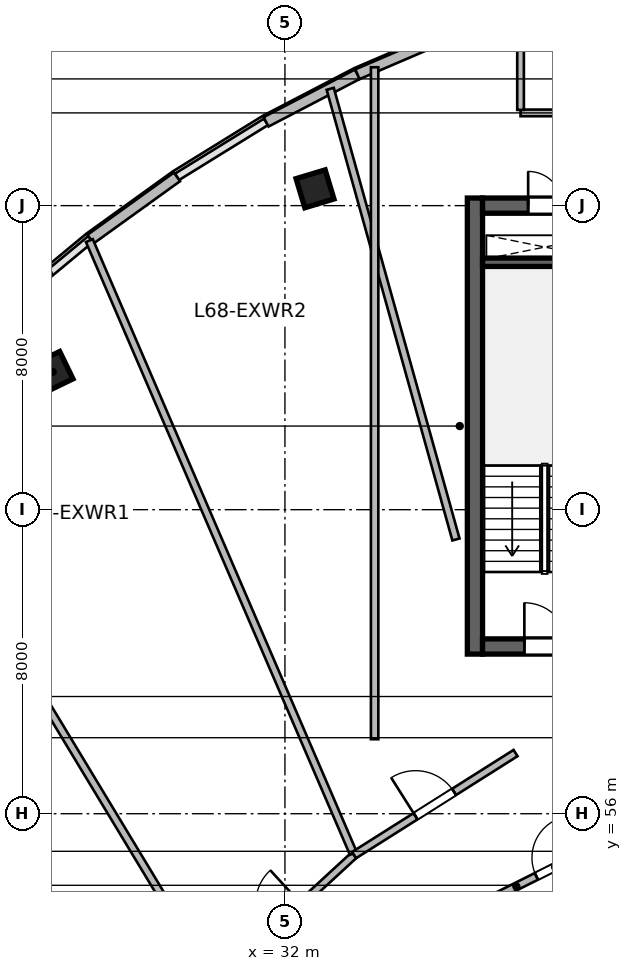
"""IFC4 building model, lengths in metres.
Left out: names, types, materials, properties, quantities, classifications, styles, units other than length and angle.
Written with IfcOpenShell. Run it as: python <this file> out.ifc"""

import sys

from ifc_helpers import new_model, si_unit, direction, frame, frame_2d, origin, origin_2d, place, context, subcontext, project, spatial, rectangle, extrude, source, transform, mapped, element, fill, save


model = new_model("IFC4")
c1 = context("Model", 3, precision=1e-05, world=origin(), true_north=direction((0.0, 1.0)))
c2 = subcontext(c1, "Body", "Model", "MODEL_VIEW")
j1 = project(units=[si_unit("LENGTHUNIT", "METRE"), si_unit("PLANEANGLEUNIT", "RADIAN")], contexts=[c1])
p1 = place(None, origin())
s1 = spatial("IfcSite", under=j1, at=p1, CompositionType="ELEMENT")
p2 = place(p1, origin())
s2 = spatial("IfcBuilding", under=s1, at=p2, CompositionType="ELEMENT")
p3 = place(p2, frame((0.0, 0.0, 279.6)))
s3 = spatial("IfcBuildingStorey", under=s2, at=p3, CompositionType="ELEMENT", Elevation=279.6)
m1 = source(origin(), c2, "Body", "SweptSolid", [
    extrude(rectangle(XDim=12.0, YDim=0.4, at=frame_2d((6.0, 0.0))), origin(), (0.0, 0.0, 1.0), 3.9),
])
p4 = place(p3, frame((37.0, 60.2, 0.0), z_axis=(0.0, 0.0, 1.0), x_axis=(0.0, 1.0, 0.0)))
e1 = element("IfcWall", 1, at=p4, inside=s3, PredefinedType="SHEAR", context=c2, shape_type="MappedRepresentation", body=[
    mapped(m1, transform((0.0, 0.0, 0.0), scale=1.0)),
])
m2 = source(origin(), c2, "Body", "SweptSolid", [
    extrude(rectangle(XDim=21.6, YDim=0.4, at=frame_2d((10.8, 0.0))), origin(), (0.0, 0.0, 1.0), 3.9),
])
p5 = place(p3, frame((37.2, 60.4, 0.0), z_axis=(0.0, 0.0, 1.0), x_axis=(1.0, 0.0, 0.0)))
e2 = element("IfcWall", 2, at=p5, inside=s3, PredefinedType="SHEAR", context=c2, shape_type="MappedRepresentation", body=[
    mapped(m2, transform((0.0, 0.0, 0.0), scale=1.0)),
])
p6 = place(p5, frame((1.1, 0.0, 0.0)))
e3 = element("IfcOpeningElement", 3, at=p6, cuts=e2, PredefinedType="OPENING", context=c2, shape_type="SweptSolid", body=[
    extrude(rectangle(XDim=1.15, YDim=2.15, at=frame_2d((0.575, 1.075))), frame((0.0, 0.21, 0.0), z_axis=(0.0, -1.0, 0.0), x_axis=(1.0, 0.0, 0.0)), (0.0, 0.0, 1.0), 0.42),
])
p7 = place(p5, frame((19.5, 0.0, 0.0)))
e4 = element("IfcOpeningElement", 4, at=p7, cuts=e2, PredefinedType="OPENING", context=c2, shape_type="SweptSolid", body=[
    extrude(rectangle(XDim=0.9, YDim=2.1, at=frame_2d((0.45, 1.05))), frame((0.0, 0.21, 0.0), z_axis=(0.0, -1.0, 0.0), x_axis=(1.0, 0.0, 0.0)), (0.0, 0.0, 1.0), 0.42),
])
p8 = place(p5, frame((12.02, 0.0, 0.0)))
e5 = element("IfcOpeningElement", 5, at=p8, cuts=e2, PredefinedType="OPENING", context=c2, shape_type="SweptSolid", body=[
    extrude(rectangle(XDim=1.6, YDim=2.15, at=frame_2d((0.8, 1.075))), frame((0.0, 0.21, 0.0), z_axis=(0.0, -1.0, 0.0), x_axis=(1.0, 0.0, 0.0)), (0.0, 0.0, 1.0), 0.42),
])
p9 = place(p3, frame((37.2, 72.0, 0.0), z_axis=(0.0, 0.0, 1.0), x_axis=(1.0, 0.0, 0.0)))
e6 = element("IfcWall", 6, at=p9, inside=s3, PredefinedType="SHEAR", context=c2, shape_type="MappedRepresentation", body=[
    mapped(m2, transform((0.0, 0.0, 0.0), scale=1.0)),
])
p10 = place(p9, frame((1.2, 0.0, 0.0)))
e7 = element("IfcOpeningElement", 7, at=p10, cuts=e6, PredefinedType="OPENING", context=c2, shape_type="SweptSolid", body=[
    extrude(rectangle(XDim=0.9, YDim=2.1, at=frame_2d((0.45, 1.05))), frame((0.0, 0.21, 0.0), z_axis=(0.0, -1.0, 0.0), x_axis=(1.0, 0.0, 0.0)), (0.0, 0.0, 1.0), 0.42),
])
p11 = place(p9, frame((14.7, 0.0, 0.0)))
e8 = element("IfcOpeningElement", 8, at=p11, cuts=e6, PredefinedType="OPENING", context=c2, shape_type="SweptSolid", body=[
    extrude(rectangle(XDim=1.2, YDim=2.15, at=frame_2d((0.6, 1.075))), frame((0.0, 0.21, 0.0), z_axis=(0.0, -1.0, 0.0), x_axis=(1.0, 0.0, 0.0)), (0.0, 0.0, 1.0), 0.42),
])
p12 = place(p9, frame((4.15, 0.0, 0.0)))
e9 = element("IfcOpeningElement", 9, at=p12, cuts=e6, PredefinedType="OPENING", context=c2, shape_type="SweptSolid", body=[
    extrude(rectangle(XDim=1.3, YDim=2.15, at=frame_2d((0.65, 1.075))), frame((0.0, 0.21, 0.0), z_axis=(0.0, -1.0, 0.0), x_axis=(1.0, 0.0, 0.0)), (0.0, 0.0, 1.0), 0.42),
])
p13 = place(p9, frame((7.25, 0.0, 0.0)))
e10 = element("IfcOpeningElement", 10, at=p13, cuts=e6, PredefinedType="OPENING", context=c2, shape_type="SweptSolid", body=[
    extrude(rectangle(XDim=0.9, YDim=2.1, at=frame_2d((0.45, 1.05))), frame((0.0, 0.21, 0.0), z_axis=(0.0, -1.0, 0.0), x_axis=(1.0, 0.0, 0.0)), (0.0, 0.0, 1.0), 0.42),
])
m3 = source(origin(), c2, "Body", "SweptSolid", [
    extrude(rectangle(XDim=3.27, YDim=0.22, at=frame_2d((1.635, 0.0))), origin(), (0.0, 0.0, 1.0), 3.9),
])
p14 = place(p3, frame((37.2, 70.51, 0.0), z_axis=(0.0, 0.0, 1.0), x_axis=(1.0, 0.0, 0.0)))
e11 = element("IfcWall", 11, at=p14, inside=s3, PredefinedType="SHEAR", context=c2, shape_type="MappedRepresentation", body=[
    mapped(m3, transform((0.0, 0.0, 0.0), scale=1.0)),
])
m4 = source(origin(), c2, "Body", "SweptSolid", [
    extrude(rectangle(XDim=0.8, YDim=0.8, at=origin_2d()), origin(), (0.0, 0.0, 1.0), 3.9),
])
for number, where, z_axis, x_axis in (
    (12, (25.888, 67.627, 0.0), (0.0, 0.0, 1.0), (-0.436, 0.9, 0.0)),
    (13, (32.791, 72.442, 0.0), (0.0, 0.0, 1.0), (-0.289, 0.957, 0.0)),
):
    element("IfcColumn", number, at=place(p3, frame(where, z_axis=z_axis, x_axis=x_axis)), inside=s3, PredefinedType="COLUMN", context=c2, shape_type="MappedRepresentation", body=[
        mapped(m4, transform((0.0, 0.0, 0.0), scale=1.0)),
    ])
m5 = source(origin(), c2, "Body", "SweptSolid", [
    extrude(rectangle(XDim=2.802, YDim=0.28, at=frame_2d((1.401, 0.0))), origin(), (0.0, 0.0, 1.0), 3.64),
])
p15 = place(p3, frame((26.885, 71.12, 0.0), z_axis=(0.0, 0.0, 1.0), x_axis=(0.811507896482, 0.584341453217, 0.0)))
e14 = element("IfcWall", 14, at=p15, inside=s3, PredefinedType="SOLIDWALL", context=c2, shape_type="MappedRepresentation", body=[
    mapped(m5, transform((0.0, 0.0, 0.0), scale=1.0)),
])
m6 = source(origin(), c2, "Body", "SweptSolid", [
    extrude(rectangle(XDim=2.711, YDim=0.28, at=frame_2d((1.356, 0.0))), origin(), (0.0, 0.0, 1.0), 3.64),
])
p16 = place(p3, frame((31.502, 74.205, 0.0), z_axis=(0.0, 0.0, 1.0), x_axis=(0.886828760751, 0.462098202881, 0.0)))
e15 = element("IfcWall", 15, at=p16, inside=s3, PredefinedType="SOLIDWALL", context=c2, shape_type="MappedRepresentation", body=[
    mapped(m6, transform((0.0, 0.0, 0.0), scale=1.0)),
])
m7 = source(origin(), c2, "Body", "SweptSolid", [
    extrude(rectangle(XDim=2.673, YDim=0.28, at=frame_2d((1.337, 0.0))), origin(), (0.0, 0.0, 1.0), 3.64),
])
p17 = place(p3, frame((33.907, 75.458, 0.0), z_axis=(0.0, 0.0, 1.0), x_axis=(0.919036345912, 0.394172798266, 0.0)))
e16 = element("IfcWall", 16, at=p17, inside=s3, PredefinedType="SOLIDWALL", context=c2, shape_type="MappedRepresentation", body=[
    mapped(m7, transform((0.0, 0.0, 0.0), scale=1.0)),
])
m8 = source(origin(), c2, "Body", "SweptSolid", [
    extrude(rectangle(XDim=4.0, YDim=0.175, at=frame_2d((2.0, 0.0))), origin(), (0.0, 0.0, 1.0), 3.64),
])
p18 = place(p3, frame((38.2, 74.44, 0.0), z_axis=(0.0, 0.0, 1.0), x_axis=(1.0, 0.0, 0.0)))
e17 = element("IfcWall", 17, at=p18, inside=s3, PredefinedType="PARTITIONING", context=c2, shape_type="MappedRepresentation", body=[
    mapped(m8, transform((0.0, 0.0, 0.0), scale=1.0)),
])
p19 = place(p18, frame((2.7, 0.0, 0.0)))
e18 = element("IfcOpeningElement", 18, at=p19, cuts=e17, PredefinedType="OPENING", context=c2, shape_type="SweptSolid", body=[
    extrude(rectangle(XDim=0.9, YDim=2.08, at=frame_2d((0.45, 1.04))), frame((0.0, 0.098, 0.0), z_axis=(0.0, -1.0, 0.0), x_axis=(1.0, 0.0, 0.0)), (0.0, 0.0, 1.0), 0.195),
])
m9 = source(origin(), c2, "Body", "SweptSolid", [
    extrude(rectangle(XDim=2.403, YDim=0.175, at=frame_2d((1.201, 0.0))), origin(), (0.0, 0.0, 1.0), 3.64),
])
p20 = place(p3, frame((38.2, 74.519, 0.0), z_axis=(0.0, 0.0, 1.0), x_axis=(0.0, 1.0, 0.0)))
e19 = element("IfcWall", 19, at=p20, inside=s3, PredefinedType="PARTITIONING", context=c2, shape_type="MappedRepresentation", body=[
    mapped(m9, transform((0.0, 0.0, 0.0), scale=1.0)),
])
m10 = source(origin(), c2, "Body", "SweptSolid", [
    extrude(rectangle(XDim=4.271, YDim=0.195, at=frame_2d((2.135, 0.0))), origin(), (0.0, 0.0, 1.0), 3.64),
])
p21 = place(p3, frame((37.021, 53.552, 0.0), z_axis=(0.0, 0.0, 1.0), x_axis=(0.894061035522, 0.447945158207, 0.0)))
e20 = element("IfcWall", 20, at=p21, inside=s3, PredefinedType="PARTITIONING", context=c2, shape_type="MappedRepresentation", body=[
    mapped(m10, transform((0.0, 0.0, 0.0), scale=1.0)),
])
p22 = place(p21, frame((1.785, 0.0, 0.0)))
e21 = element("IfcOpeningElement", 21, at=p22, cuts=e20, PredefinedType="OPENING", context=c2, shape_type="SweptSolid", body=[
    extrude(rectangle(XDim=1.1, YDim=2.15, at=frame_2d((0.55, 1.075))), frame((0.0, 0.107, 0.0), z_axis=(0.0, -1.0, 0.0), x_axis=(1.0, 0.0, 0.0)), (0.0, 0.0, 1.0), 0.215),
])
m11 = source(origin(), c2, "Body", "SweptSolid", [
    extrude(rectangle(XDim=4.986, YDim=0.195, at=frame_2d((2.493, 0.0))), origin(), (0.0, 0.0, 1.0), 3.64),
])
p23 = place(p3, frame((30.153, 51.533, 0.0), z_axis=(0.0, 0.0, 1.0), x_axis=(0.735595190169, 0.677421372707, 0.0)))
e22 = element("IfcWall", 22, at=p23, inside=s3, PredefinedType="PARTITIONING", context=c2, shape_type="MappedRepresentation", body=[
    mapped(m11, transform((0.0, 0.0, 0.0), scale=1.0)),
])
p24 = place(p23, frame((1.893, 0.0, 0.0)))
e23 = element("IfcOpeningElement", 23, at=p24, cuts=e22, PredefinedType="OPENING", context=c2, shape_type="SweptSolid", body=[
    extrude(rectangle(XDim=1.2, YDim=2.15, at=frame_2d((0.6, 1.075))), frame((0.0, 0.107, 0.0), z_axis=(0.0, -1.0, 0.0), x_axis=(1.0, 0.0, 0.0)), (0.0, 0.0, 1.0), 0.215),
])
m12 = source(origin(), c2, "Body", "SweptSolid", [
    extrude(rectangle(XDim=16.121, YDim=0.195, at=frame_2d((8.061, 0.0))), origin(), (0.0, 0.0, 1.0), 3.64),
])
p25 = place(p3, frame((30.127, 51.575, 0.0), z_axis=(0.0, 0.0, 1.0), x_axis=(-0.517212483904, 0.855857024563, 0.0)))
e24 = element("IfcWall", 24, at=p25, inside=s3, PredefinedType="PARTITIONING", context=c2, shape_type="MappedRepresentation", body=[
    mapped(m12, transform((0.0, 0.0, 0.0), scale=1.0)),
])
m13 = source(origin(), c2, "Body", "SweptSolid", [
    extrude(rectangle(XDim=17.556, YDim=0.195, at=frame_2d((8.778, 0.0))), origin(), (0.0, 0.0, 1.0), 3.64),
])
p26 = place(p3, frame((33.8, 54.958, 0.0), z_axis=(0.0, 0.0, 1.0), x_axis=(-0.395687598313, 0.918385172213, 0.0)))
e25 = element("IfcWall", 25, at=p26, inside=s3, PredefinedType="PARTITIONING", context=c2, shape_type="MappedRepresentation", body=[
    mapped(m13, transform((0.0, 0.0, 0.0), scale=1.0)),
])
m14 = source(origin(), c2, "Body", "SweptSolid", [
    extrude(rectangle(XDim=5.025, YDim=0.195, at=frame_2d((2.513, 0.0))), origin(), (0.0, 0.0, 1.0), 3.64),
])
p27 = place(p3, frame((33.82, 54.911, 0.0), z_axis=(0.0, 0.0, 1.0), x_axis=(0.84532378062, 0.534254345717, 0.0)))
e26 = element("IfcWall", 26, at=p27, inside=s3, PredefinedType="PARTITIONING", context=c2, shape_type="MappedRepresentation", body=[
    mapped(m14, transform((0.0, 0.0, 0.0), scale=1.0)),
])
p28 = place(p27, frame((1.913, 0.0, 0.0)))
e27 = element("IfcOpeningElement", 27, at=p28, cuts=e26, PredefinedType="OPENING", context=c2, shape_type="SweptSolid", body=[
    extrude(rectangle(XDim=1.2, YDim=2.15, at=frame_2d((0.6, 1.075))), frame((0.0, 0.107, 0.0), z_axis=(0.0, -1.0, 0.0), x_axis=(1.0, 0.0, 0.0)), (0.0, 0.0, 1.0), 0.215),
])
m15 = source(origin(), c2, "Body", "SweptSolid", [
    extrude(rectangle(XDim=12.311, YDim=0.195, at=frame_2d((6.155, 0.0))), origin(), (0.0, 0.0, 1.0), 3.64),
])
p29 = place(p3, frame((36.5, 63.216, 0.0), z_axis=(0.0, 0.0, 1.0), x_axis=(-0.268759602651, 0.963207286093, 0.0)))
e28 = element("IfcWall", 28, at=p29, inside=s3, PredefinedType="PARTITIONING", context=c2, shape_type="MappedRepresentation", body=[
    mapped(m15, transform((0.0, 0.0, 0.0), scale=1.0)),
])
m16 = source(origin(), c2, "Body", "SweptSolid", [
    extrude(rectangle(XDim=17.681, YDim=0.195, at=frame_2d((8.84, 0.0))), origin(), (0.0, 0.0, 1.0), 3.64),
])
p30 = place(p3, frame((34.36, 57.96, 0.0), z_axis=(0.0, 0.0, 1.0), x_axis=(0.0, 1.0, 0.0)))
e29 = element("IfcWall", 29, at=p30, inside=s3, PredefinedType="PARTITIONING", context=c2, shape_type="MappedRepresentation", body=[
    mapped(m16, transform((0.0, 0.0, 0.0), scale=1.0)),
])
m17 = source(origin(), c2, "Body", "SweptSolid", [
    extrude(rectangle(XDim=1.15, YDim=2.15, at=frame_2d((0.575, 1.075))), frame((0.0, 0.025, 0.0), z_axis=(0.0, -1.0, 0.0), x_axis=(1.0, 0.0, 0.0)), (0.0, 0.0, 1.0), 0.05),
])
p31 = place(p6, origin())
e30 = element("IfcDoor", 30, at=p31, inside=s3, OperationType="SINGLE_SWING_LEFT", PredefinedType="DOOR", context=c2, shape_type="MappedRepresentation", body=[
    mapped(m17, transform((0.0, 0.0, 0.0), scale=1.0)),
])
fill(e3, e30)
m18 = source(origin(), c2, "Body", "SweptSolid", [
    extrude(rectangle(XDim=0.9, YDim=2.1, at=frame_2d((0.45, 1.05))), frame((0.0, 0.025, 0.0), z_axis=(0.0, -1.0, 0.0), x_axis=(1.0, 0.0, 0.0)), (0.0, 0.0, 1.0), 0.05),
])
p32 = place(p10, origin())
e31 = element("IfcDoor", 31, at=p32, inside=s3, OperationType="SINGLE_SWING_LEFT", PredefinedType="DOOR", context=c2, shape_type="MappedRepresentation", body=[
    mapped(m18, transform((0.0, 0.0, 0.0), scale=1.0)),
])
fill(e7, e31)
m19 = source(origin(), c2, "Body", "SweptSolid", [
    extrude(rectangle(XDim=1.1, YDim=2.15, at=frame_2d((0.55, 1.075))), frame((0.0, 0.025, 0.0), z_axis=(0.0, -1.0, 0.0), x_axis=(1.0, 0.0, 0.0)), (0.0, 0.0, 1.0), 0.05),
])
p33 = place(p22, origin())
e32 = element("IfcDoor", 32, at=p33, inside=s3, OperationType="SINGLE_SWING_RIGHT", PredefinedType="DOOR", context=c2, shape_type="MappedRepresentation", body=[
    mapped(m19, transform((0.0, 0.0, 0.0), scale=1.0)),
])
fill(e21, e32)
m20 = source(origin(), c2, "Body", "SweptSolid", [
    extrude(rectangle(XDim=1.2, YDim=2.15, at=frame_2d((0.6, 1.075))), frame((0.0, 0.025, 0.0), z_axis=(0.0, -1.0, 0.0), x_axis=(1.0, 0.0, 0.0)), (0.0, 0.0, 1.0), 0.05),
])
p34 = place(p28, origin())
e33 = element("IfcDoor", 33, at=p34, inside=s3, OperationType="SINGLE_SWING_LEFT", PredefinedType="DOOR", context=c2, shape_type="MappedRepresentation", body=[
    mapped(m20, transform((0.0, 0.0, 0.0), scale=1.0)),
])
fill(e27, e33)
save(model, sys.argv[1])
